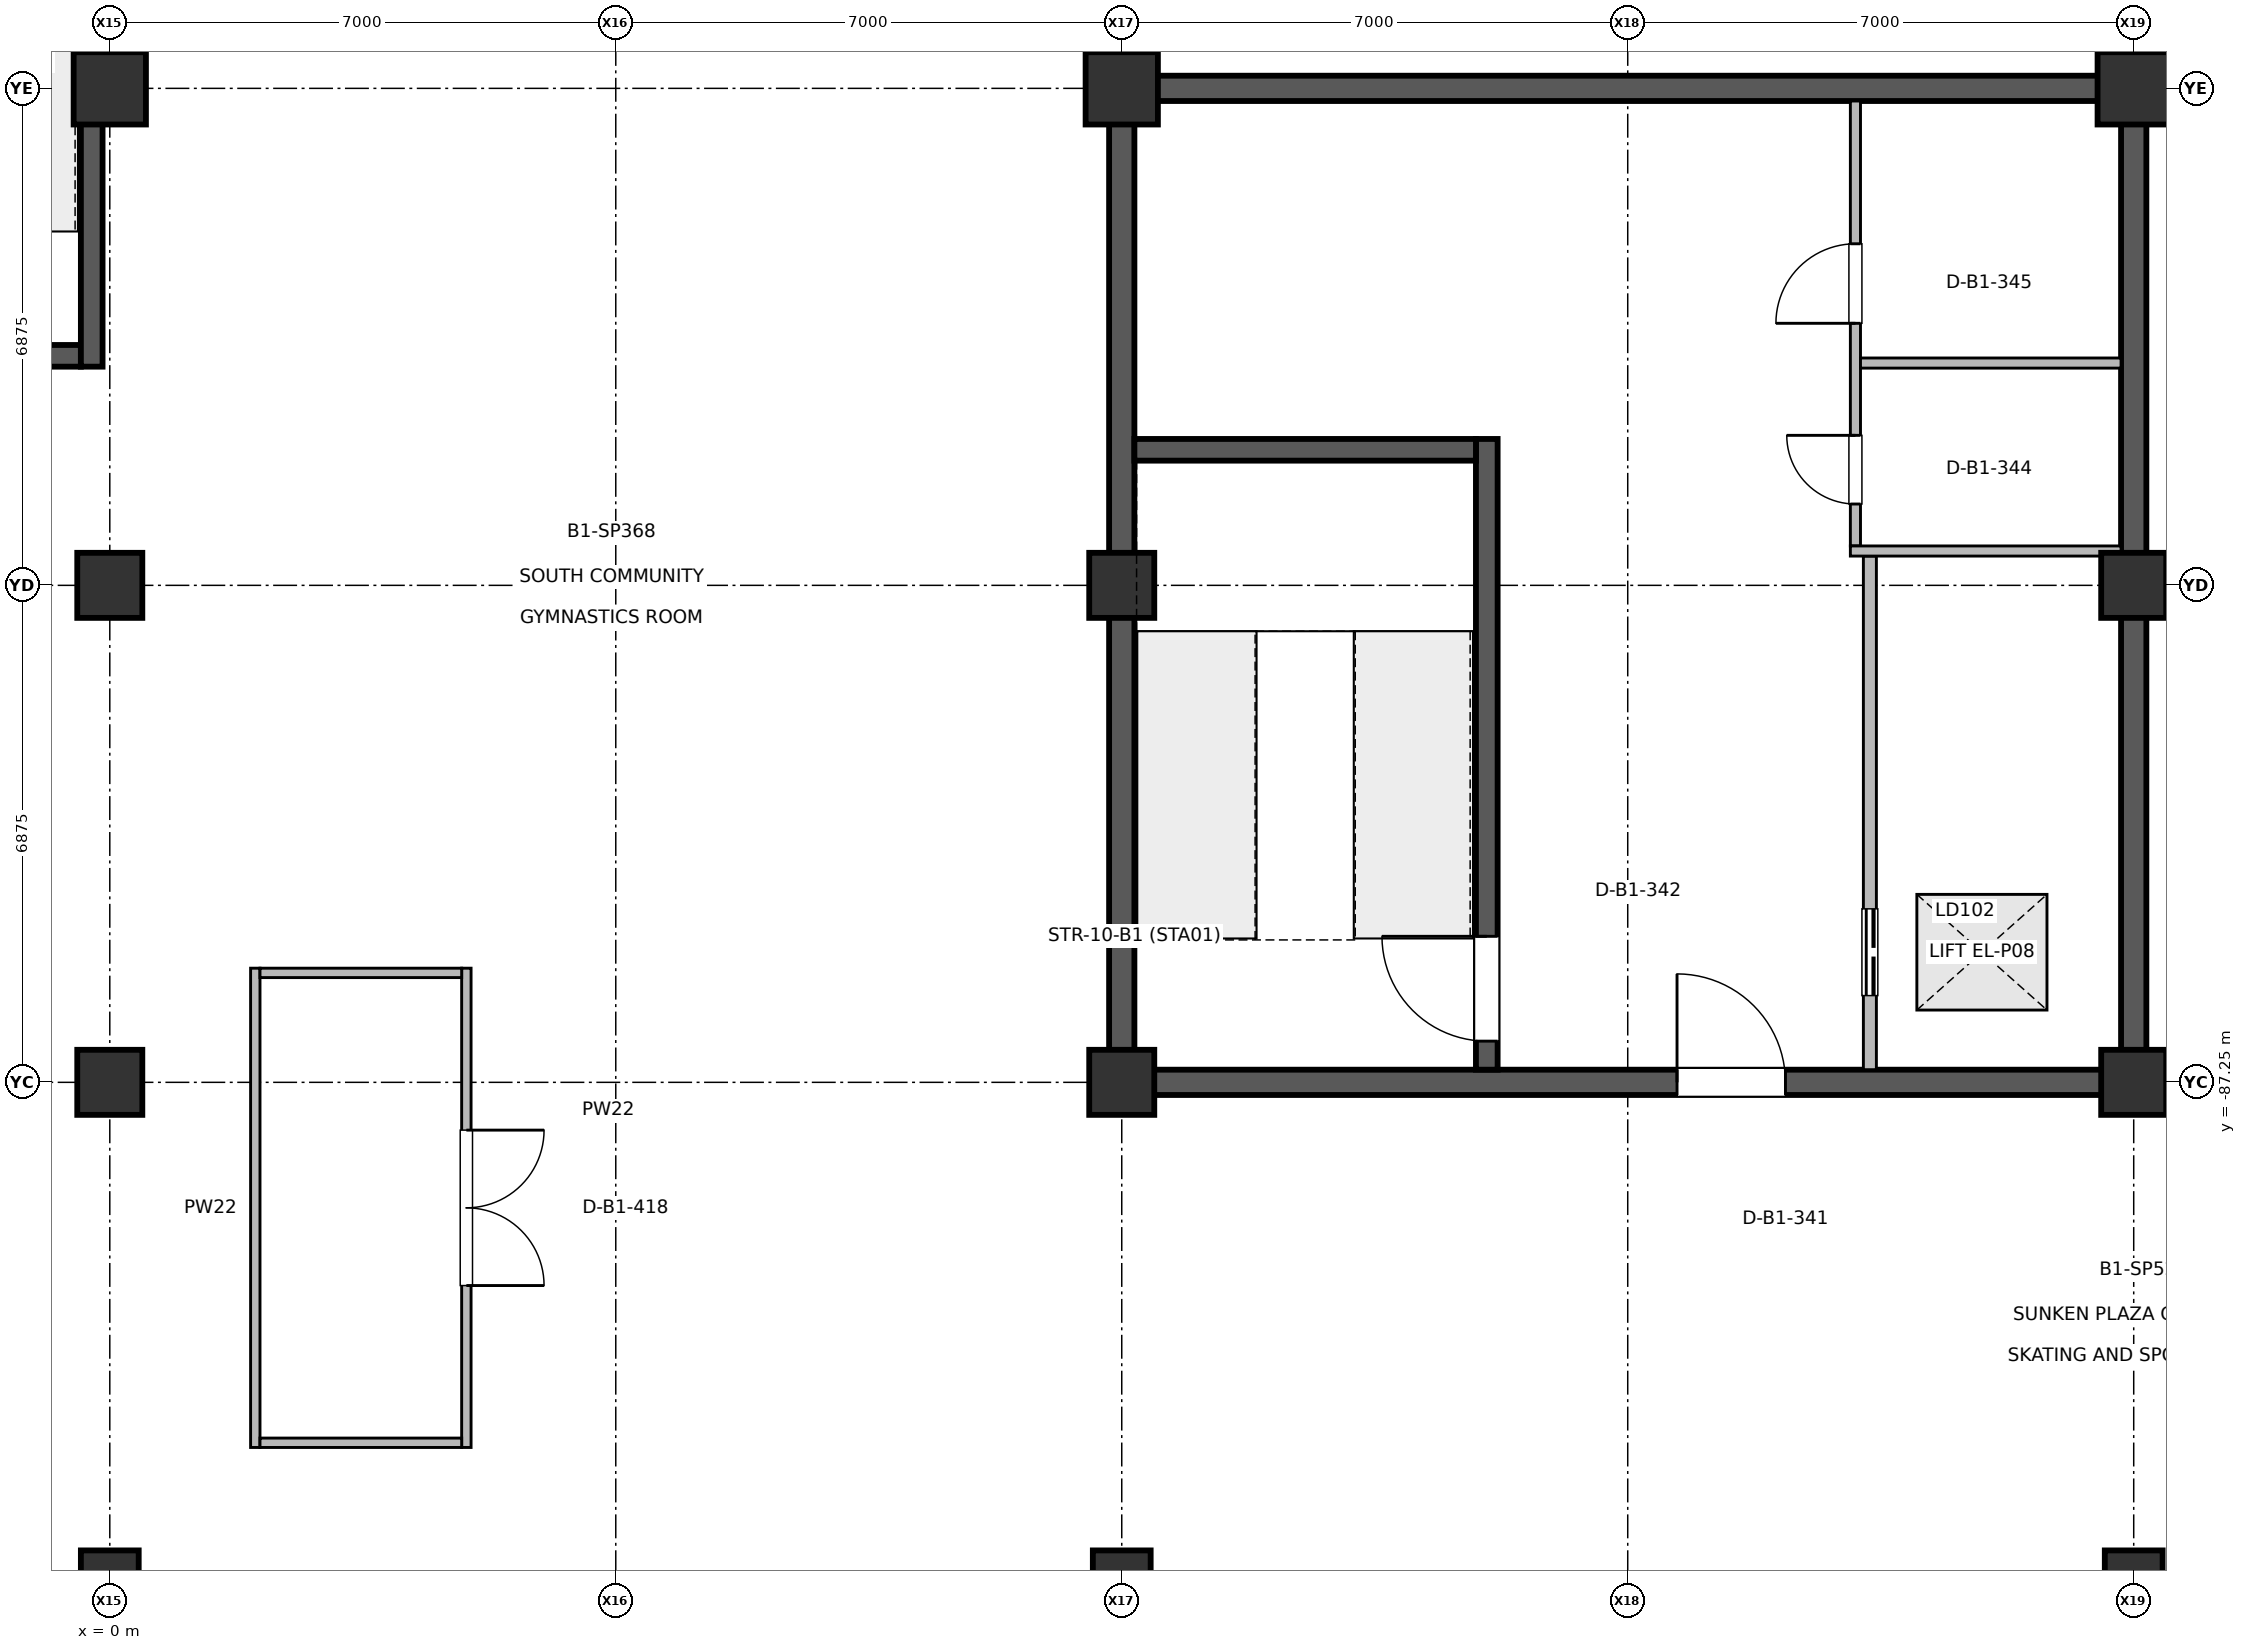
"""IFC4 building model, lengths in metres.
Left out: names, types, materials, properties, quantities, classifications, styles, units other than length and angle.
Written with IfcOpenShell. Run it as: python <this file> out.ifc"""

import sys

from ifc_helpers import new_model, si_unit, direction, frame, frame_2d, origin, origin_2d, place, context, subcontext, project, spatial, rectangle, circle, extrude, element, fill, save


model = new_model("IFC4")
c1 = context("Model", 3, precision=1e-05, world=origin(), true_north=direction((0.0, 1.0)))
c2 = subcontext(c1, "Body", "Model", "MODEL_VIEW")
j1 = project(units=[si_unit("LENGTHUNIT", "METRE"), si_unit("PLANEANGLEUNIT", "RADIAN")], contexts=[c1])
p1 = place(None, origin())
s1 = spatial("IfcSite", under=j1, at=p1, CompositionType="ELEMENT")
p2 = place(p1, origin())
s2 = spatial("IfcBuilding", under=s1, at=p2, CompositionType="ELEMENT")
p3 = place(p2, frame((0.0, 0.0, -6.0)))
s3 = spatial("IfcBuildingStorey", under=s2, at=p3, CompositionType="ELEMENT", Elevation=-6.0)
p4 = place(p3, frame((0.0, -94.125, 0.0), z_axis=(0.0, 0.0, 1.0), x_axis=(1.0, 0.0, 0.0)))
e1 = element("IfcColumn", 1, at=p4, inside=s3, PredefinedType="COLUMN", context=c2, shape_type="SweptSolid", body=[
    extrude(circle(Radius=0.4, at=origin_2d()), origin(), (0.0, 0.0, 1.0), 5.998),
])
for number, where, z_axis, x_axis in (
    (2, (0.0, -87.25, 0.0), (0.0, 0.0, 1.0), (1.0, 0.0, 0.0)),
    (3, (0.0, -80.375, 0.0), (0.0, 0.0, 1.0), (1.0, 0.0, 0.0)),
):
    element("IfcColumn", number, at=place(p3, frame(where, z_axis=z_axis, x_axis=x_axis)), inside=s3, PredefinedType="COLUMN", context=c2, shape_type="SweptSolid", body=[
        extrude(rectangle(XDim=0.9, YDim=0.9, at=origin_2d()), origin(), (0.0, 0.0, 1.0), 5.998),
    ])
p5 = place(p3, frame((0.0, -73.5, 0.0), z_axis=(0.0, 0.0, 1.0), x_axis=(1.0, 0.0, 0.0)))
e4 = element("IfcColumn", 4, at=p5, inside=s3, PredefinedType="COLUMN", context=c2, shape_type="SweptSolid", body=[
    extrude(rectangle(XDim=1.0, YDim=1.0, at=origin_2d()), origin(), (0.0, 0.0, 1.0), 5.998),
])
p6 = place(p3, frame((14.0, -94.125, 0.0), z_axis=(0.0, 0.0, 1.0), x_axis=(1.0, 0.0, 0.0)))
e5 = element("IfcColumn", 5, at=p6, inside=s3, PredefinedType="COLUMN", context=c2, shape_type="SweptSolid", body=[
    extrude(circle(Radius=0.4, at=origin_2d()), origin(), (0.0, 0.0, 1.0), 5.998),
])
for number, where, z_axis, x_axis in (
    (6, (14.0, -87.25, 0.0), (0.0, 0.0, 1.0), (1.0, 0.0, 0.0)),
    (7, (14.0, -80.375, 0.0), (0.0, 0.0, 1.0), (1.0, 0.0, 0.0)),
):
    element("IfcColumn", number, at=place(p3, frame(where, z_axis=z_axis, x_axis=x_axis)), inside=s3, PredefinedType="COLUMN", context=c2, shape_type="SweptSolid", body=[
        extrude(rectangle(XDim=0.9, YDim=0.9, at=origin_2d()), origin(), (0.0, 0.0, 1.0), 5.998),
    ])
p7 = place(p3, frame((14.0, -73.5, 0.0), z_axis=(0.0, 0.0, 1.0), x_axis=(1.0, 0.0, 0.0)))
e8 = element("IfcColumn", 8, at=p7, inside=s3, PredefinedType="COLUMN", context=c2, shape_type="SweptSolid", body=[
    extrude(rectangle(XDim=1.0, YDim=1.0, at=origin_2d()), origin(), (0.0, 0.0, 1.0), 5.998),
])
p8 = place(p3, frame((28.0, -94.125, 0.0), z_axis=(0.0, 0.0, 1.0), x_axis=(1.0, 0.0, 0.0)))
e9 = element("IfcColumn", 9, at=p8, inside=s3, PredefinedType="COLUMN", context=c2, shape_type="SweptSolid", body=[
    extrude(circle(Radius=0.4, at=origin_2d()), origin(), (0.0, 0.0, 1.0), 5.998),
])
for number, where, z_axis, x_axis in (
    (10, (28.0, -87.25, 0.0), (0.0, 0.0, 1.0), (1.0, 0.0, 0.0)),
    (11, (28.0, -80.375, 0.0), (0.0, 0.0, 1.0), (1.0, 0.0, 0.0)),
):
    element("IfcColumn", number, at=place(p3, frame(where, z_axis=z_axis, x_axis=x_axis)), inside=s3, PredefinedType="COLUMN", context=c2, shape_type="SweptSolid", body=[
        extrude(rectangle(XDim=0.9, YDim=0.9, at=origin_2d()), origin(), (0.0, 0.0, 1.0), 5.998),
    ])
p9 = place(p3, frame((28.0, -73.5, 0.0), z_axis=(0.0, 0.0, 1.0), x_axis=(1.0, 0.0, 0.0)))
e12 = element("IfcColumn", 12, at=p9, inside=s3, PredefinedType="COLUMN", context=c2, shape_type="SweptSolid", body=[
    extrude(rectangle(XDim=1.0, YDim=1.0, at=origin_2d()), origin(), (0.0, 0.0, 1.0), 5.998),
])
for number, where, z_axis, x_axis in (
    (13, (14.0, -87.075, 0.0), (0.0, 0.0, 1.0), (0.0, 1.0, 0.0)),
    (14, (28.0, -87.075, 0.0), (0.0, 0.0, 1.0), (0.0, 1.0, 0.0)),
):
    element("IfcWall", number, at=place(p3, frame(where, z_axis=z_axis, x_axis=x_axis)), inside=s3, PredefinedType="SHEAR", context=c2, shape_type="SweptSolid", body=[
        extrude(rectangle(XDim=13.4, YDim=0.35, at=frame_2d((6.7, 0.0))), origin(), (0.0, 0.0, 1.0), 5.75),
    ])
p10 = place(p3, frame((14.175, -87.25, 0.0), z_axis=(0.0, 0.0, 1.0), x_axis=(1.0, 0.0, 0.0)))
e15 = element("IfcWall", 15, at=p10, inside=s3, PredefinedType="SHEAR", context=c2, shape_type="SweptSolid", body=[
    extrude(rectangle(XDim=13.65, YDim=0.35, at=frame_2d((6.825, 0.0))), origin(), (0.0, 0.0, 1.0), 5.75),
])
p11 = place(p10, frame((7.507, 0.0, 0.0)))
e16 = element("IfcOpeningElement", 16, at=p11, cuts=e15, PredefinedType="OPENING", context=c2, shape_type="SweptSolid", body=[
    extrude(rectangle(XDim=1.5, YDim=2.2, at=frame_2d((0.75, 1.1))), frame((0.0, 0.185, 0.0), z_axis=(0.0, -1.0, 0.0), x_axis=(1.0, 0.0, 0.0)), (0.0, 0.0, 1.0), 0.37),
])
p12 = place(p3, frame((14.175, -73.5, 0.0), z_axis=(0.0, 0.0, 1.0), x_axis=(1.0, 0.0, 0.0)))
e17 = element("IfcWall", 17, at=p12, inside=s3, PredefinedType="SHEAR", context=c2, shape_type="SweptSolid", body=[
    extrude(rectangle(XDim=13.65, YDim=0.35, at=frame_2d((6.825, 0.0))), origin(), (0.0, 0.0, 1.0), 5.75),
])
p13 = place(p3, frame((19.05, -87.075, 0.0), z_axis=(0.0, 0.0, 1.0), x_axis=(0.0, 1.0, 0.0)))
e18 = element("IfcWall", 18, at=p13, inside=s3, PredefinedType="SHEAR", context=c2, shape_type="SweptSolid", body=[
    extrude(rectangle(XDim=8.725, YDim=0.3, at=frame_2d((4.362, 0.0))), origin(), (0.0, 0.0, 1.0), 5.75),
])
p14 = place(p13, frame((0.395, 0.0, 0.0)))
e19 = element("IfcOpeningElement", 19, at=p14, cuts=e18, PredefinedType="OPENING", context=c2, shape_type="SweptSolid", body=[
    extrude(rectangle(XDim=1.45, YDim=2.2, at=frame_2d((0.725, 1.1))), frame((0.0, 0.16, 0.0), z_axis=(0.0, -1.0, 0.0), x_axis=(1.0, 0.0, 0.0)), (0.0, 0.0, 1.0), 0.32),
])
p15 = place(p3, frame((24.35, -87.075, 0.0), z_axis=(0.0, 0.0, 1.0), x_axis=(0.0, 1.0, 0.0)))
e20 = element("IfcWall", 20, at=p15, inside=s3, PredefinedType="PARTITIONING", context=c2, shape_type="SweptSolid", body=[
    extrude(rectangle(XDim=7.105, YDim=0.18, at=frame_2d((3.552, 0.0))), origin(), (0.0, 0.0, 1.0), 5.02),
])
p16 = place(p15, frame((1.025, 0.0, 0.0)))
e21 = element("IfcOpeningElement", 21, at=p16, cuts=e20, PredefinedType="OPENING", context=c2, shape_type="SweptSolid", body=[
    extrude(rectangle(XDim=1.2, YDim=2.25, at=frame_2d((0.6, 1.125))), frame((0.0, 0.1, 0.0), z_axis=(0.0, -1.0, 0.0), x_axis=(1.0, 0.0, 0.0)), (0.0, 0.0, 1.0), 0.2),
])
p17 = place(p3, frame((24.15, -79.83, 0.0), z_axis=(0.0, 0.0, 1.0), x_axis=(0.0, 1.0, 0.0)))
e22 = element("IfcWall", 22, at=p17, inside=s3, PredefinedType="PARTITIONING", context=c2, shape_type="SweptSolid", body=[
    extrude(rectangle(XDim=6.155, YDim=0.14, at=frame_2d((3.078, 0.0))), origin(), (0.0, 0.0, 1.0), 5.02),
])
p18 = place(p17, frame((0.58, 0.0, 0.0)))
e23 = element("IfcOpeningElement", 23, at=p18, cuts=e22, PredefinedType="OPENING", context=c2, shape_type="SweptSolid", body=[
    extrude(rectangle(XDim=0.95, YDim=2.15, at=frame_2d((0.475, 1.075))), frame((0.0, 0.08, 0.0), z_axis=(0.0, -1.0, 0.0), x_axis=(1.0, 0.0, 0.0)), (0.0, 0.0, 1.0), 0.16),
])
p19 = place(p17, frame((3.08, 0.0, 0.0)))
e24 = element("IfcOpeningElement", 24, at=p19, cuts=e22, PredefinedType="OPENING", context=c2, shape_type="SweptSolid", body=[
    extrude(rectangle(XDim=1.1, YDim=2.15, at=frame_2d((0.55, 1.075))), frame((0.0, 0.08, 0.0), z_axis=(0.0, -1.0, 0.0), x_axis=(1.0, 0.0, 0.0)), (0.0, 0.0, 1.0), 0.16),
])
p20 = place(p3, frame((4.933, -85.671, 0.0), z_axis=(0.0, 0.0, 1.0), x_axis=(0.0, -1.0, 0.0)))
e25 = element("IfcWall", 25, at=p20, inside=s3, PredefinedType="PARTITIONING", context=c2, shape_type="SweptSolid", body=[
    extrude(rectangle(XDim=6.63, YDim=0.13, at=frame_2d((3.315, 0.0))), origin(), (0.0, 0.0, 1.0), 4.625),
])
p21 = place(p20, frame((2.24, 0.0, 0.0)))
e26 = element("IfcOpeningElement", 26, at=p21, cuts=e25, PredefinedType="OPENING", context=c2, shape_type="SweptSolid", body=[
    extrude(rectangle(XDim=2.15, YDim=2.45, at=frame_2d((1.075, 1.225))), frame((0.0, 0.075, 0.0), z_axis=(0.0, -1.0, 0.0), x_axis=(1.0, 0.0, 0.0)), (0.0, 0.0, 1.0), 0.15),
])
p22 = place(p3, frame((24.08, -79.9, 0.0), z_axis=(0.0, 0.0, 1.0), x_axis=(1.0, 0.0, 0.0)))
e27 = element("IfcWall", 27, at=p22, inside=s3, PredefinedType="PARTITIONING", context=c2, shape_type="SweptSolid", body=[
    extrude(rectangle(XDim=3.745, YDim=0.14, at=frame_2d((1.873, 0.0))), origin(), (0.0, 0.0, 1.0), 5.02),
])
p23 = place(p3, frame((24.22, -77.3, 0.0), z_axis=(0.0, 0.0, 1.0), x_axis=(1.0, 0.0, 0.0)))
e28 = element("IfcWall", 28, at=p23, inside=s3, PredefinedType="PARTITIONING", context=c2, shape_type="SweptSolid", body=[
    extrude(rectangle(XDim=3.605, YDim=0.14, at=frame_2d((1.802, 0.0))), origin(), (0.0, 0.0, 1.0), 5.02),
])
p24 = place(p3, frame((2.013, -92.301, 0.0), z_axis=(0.0, 0.0, 1.0), x_axis=(0.0, 1.0, 0.0)))
e29 = element("IfcWall", 29, at=p24, inside=s3, PredefinedType="PARTITIONING", context=c2, shape_type="SweptSolid", body=[
    extrude(rectangle(XDim=6.63, YDim=0.13, at=frame_2d((3.315, 0.0))), origin(), (0.0, 0.0, 1.0), 4.625),
])
for number, where, z_axis, x_axis in (
    (30, (2.078, -92.236, 0.0), (0.0, 0.0, 1.0), (1.0, 0.0, 0.0)),
    (31, (2.078, -85.736, 0.0), (0.0, 0.0, 1.0), (1.0, 0.0, 0.0)),
):
    element("IfcWall", number, at=place(p3, frame(where, z_axis=z_axis, x_axis=x_axis)), inside=s3, PredefinedType="PARTITIONING", context=c2, shape_type="SweptSolid", body=[
        extrude(rectangle(XDim=2.79, YDim=0.13, at=frame_2d((1.395, 0.0))), origin(), (0.0, 0.0, 1.0), 5.02),
    ])
p25 = place(p3, frame((14.175, -78.5, 0.0), z_axis=(0.0, 0.0, 1.0), x_axis=(1.0, 0.0, 0.0)))
e32 = element("IfcWall", 32, at=p25, inside=s3, PredefinedType="SHEAR", context=c2, shape_type="SweptSolid", body=[
    extrude(rectangle(XDim=4.725, YDim=0.3, at=frame_2d((2.362, 0.0))), origin(), (0.0, 0.0, 1.0), 5.75),
])
p26 = place(p3, frame((-4.6, -77.2, 0.0), z_axis=(0.0, 0.0, 1.0), x_axis=(1.0, 0.0, 0.0)))
e33 = element("IfcWall", 33, at=p26, inside=s3, PredefinedType="SHEAR", context=c2, shape_type="SweptSolid", body=[
    extrude(rectangle(XDim=4.2, YDim=0.3, at=frame_2d((2.1, 0.0))), origin(), (0.0, 0.0, 1.0), 5.75),
])
p27 = place(p26, frame((1.375, 0.0, 0.0)))
e34 = element("IfcOpeningElement", 34, at=p27, cuts=e33, PredefinedType="OPENING", context=c2, shape_type="SweptSolid", body=[
    extrude(rectangle(XDim=1.45, YDim=2.2, at=frame_2d((0.725, 1.1))), frame((0.0, 0.16, 0.0), z_axis=(0.0, -1.0, 0.0), x_axis=(1.0, 0.0, 0.0)), (0.0, 0.0, 1.0), 0.32),
])
p28 = place(p3, frame((-0.25, -77.35, 0.0), z_axis=(0.0, 0.0, 1.0), x_axis=(0.0, 1.0, 0.0)))
e35 = element("IfcWall", 35, at=p28, inside=s3, PredefinedType="SHEAR", context=c2, shape_type="SweptSolid", body=[
    extrude(rectangle(XDim=8.45, YDim=0.3, at=frame_2d((4.225, 0.0))), origin(), (0.0, 0.0, 1.0), 5.75),
])
p29 = place(p11, origin())
e36 = element("IfcDoor", 36, at=p29, inside=s3, OperationType="SINGLE_SWING_LEFT", PredefinedType="DOOR", context=c2, shape_type="SweptSolid", body=[
    extrude(rectangle(XDim=1.5, YDim=2.2, at=frame_2d((0.75, 1.1))), frame((0.0, 0.025, 0.0), z_axis=(0.0, -1.0, 0.0), x_axis=(1.0, 0.0, 0.0)), (0.0, 0.0, 1.0), 0.05),
])
fill(e16, e36)
p30 = place(p14, origin())
e37 = element("IfcDoor", 37, at=p30, inside=s3, OperationType="SINGLE_SWING_RIGHT", PredefinedType="DOOR", context=c2, shape_type="SweptSolid", body=[
    extrude(rectangle(XDim=1.45, YDim=2.2, at=frame_2d((0.725, 1.1))), frame((0.0, 0.025, 0.0), z_axis=(0.0, -1.0, 0.0), x_axis=(1.0, 0.0, 0.0)), (0.0, 0.0, 1.0), 0.05),
])
fill(e19, e37)
p31 = place(p16, origin())
e38 = element("IfcDoor", 38, at=p31, inside=s3, OperationType="DOUBLE_DOOR_SLIDING", PredefinedType="DOOR", context=c2, shape_type="SweptSolid", body=[
    extrude(rectangle(XDim=1.2, YDim=2.25, at=frame_2d((0.6, 1.125))), frame((0.0, 0.025, 0.0), z_axis=(0.0, -1.0, 0.0), x_axis=(1.0, 0.0, 0.0)), (0.0, 0.0, 1.0), 0.05),
])
fill(e21, e38)
p32 = place(p18, origin())
e39 = element("IfcDoor", 39, at=p32, inside=s3, OperationType="SINGLE_SWING_RIGHT", PredefinedType="DOOR", context=c2, shape_type="SweptSolid", body=[
    extrude(rectangle(XDim=0.95, YDim=2.15, at=frame_2d((0.475, 1.075))), frame((0.0, 0.025, 0.0), z_axis=(0.0, -1.0, 0.0), x_axis=(1.0, 0.0, 0.0)), (0.0, 0.0, 1.0), 0.05),
])
fill(e23, e39)
p33 = place(p19, origin())
e40 = element("IfcDoor", 40, at=p33, inside=s3, OperationType="SINGLE_SWING_LEFT", PredefinedType="DOOR", context=c2, shape_type="SweptSolid", body=[
    extrude(rectangle(XDim=1.1, YDim=2.15, at=frame_2d((0.55, 1.075))), frame((0.0, 0.025, 0.0), z_axis=(0.0, -1.0, 0.0), x_axis=(1.0, 0.0, 0.0)), (0.0, 0.0, 1.0), 0.05),
])
fill(e24, e40)
p34 = place(p21, origin())
e41 = element("IfcDoor", 41, at=p34, inside=s3, OperationType="DOUBLE_DOOR_SINGLE_SWING", PredefinedType="DOOR", context=c2, shape_type="SweptSolid", body=[
    extrude(rectangle(XDim=2.15, YDim=2.45, at=frame_2d((1.075, 1.225))), frame((0.0, 0.025, 0.0), z_axis=(0.0, -1.0, 0.0), x_axis=(1.0, 0.0, 0.0)), (0.0, 0.0, 1.0), 0.05),
])
fill(e26, e41)
save(model, sys.argv[1])
